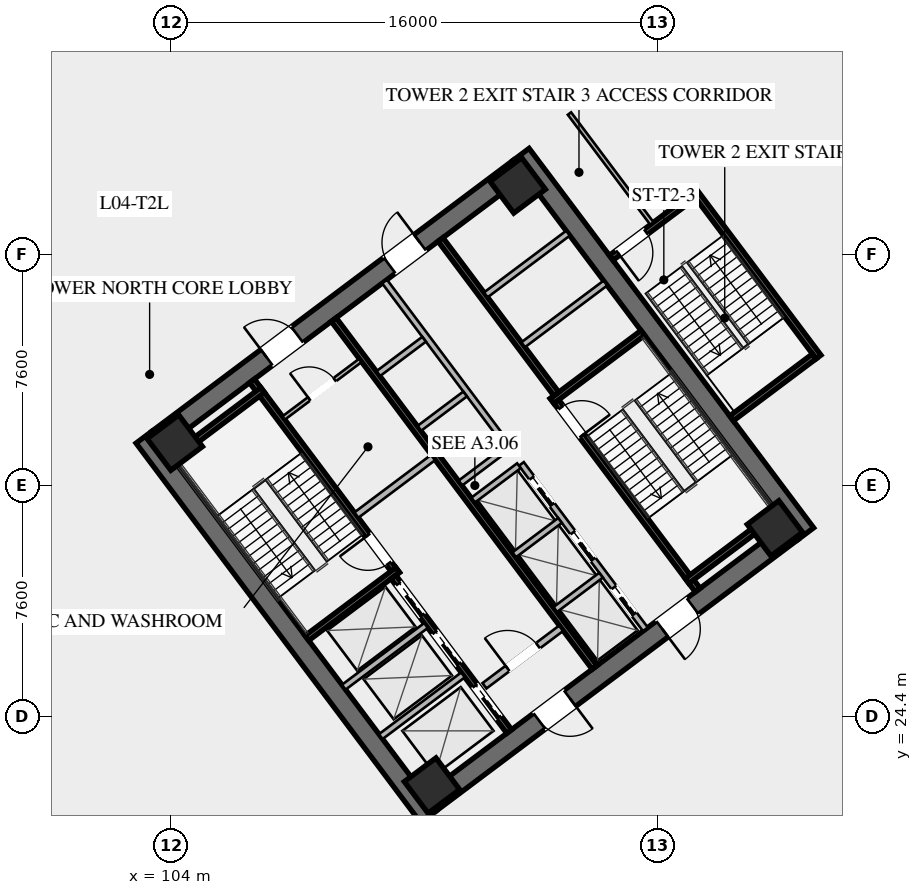
"""IFC4 building model, lengths in metres.
Left out: names, types, materials, properties, quantities, classifications, styles, units other than length and angle.
Written with IfcOpenShell. Run it as: python <this file> out.ifc"""

import sys

from ifc_helpers import new_model, si_unit, direction, frame, frame_2d, origin, origin_2d, place, context, subcontext, project, spatial, rectangle, hollow_rectangle, extrude, element, fill, save


model = new_model("IFC4")
c1 = context("Model", 3, precision=1e-05, world=origin(), true_north=direction((0.0, 1.0)))
c2 = subcontext(c1, "Body", "Model", "MODEL_VIEW")
j1 = project(units=[si_unit("LENGTHUNIT", "METRE"), si_unit("PLANEANGLEUNIT", "RADIAN")], contexts=[c1])
p1 = place(None, origin())
s1 = spatial("IfcSite", under=j1, at=p1, CompositionType="ELEMENT")
p2 = place(p1, origin())
s2 = spatial("IfcBuilding", under=s1, at=p2, CompositionType="ELEMENT")
p3 = place(p2, frame((0.0, 0.0, 19.8)))
s3 = spatial("IfcBuildingStorey", under=s2, at=p3, CompositionType="ELEMENT", Elevation=19.8)
for number, where, z_axis, x_axis in (
    (1, (112.476, 21.107, 0.0), (0.0, 0.0, 1.0), (-0.6, 0.8, 0.0)),
    (2, (115.524, 42.893, 0.0), (0.0, 0.0, 1.0), (0.6, -0.8, 0.0)),
):
    element("IfcWall", number, at=place(p3, frame(where, z_axis=z_axis, x_axis=x_axis)), inside=s3, PredefinedType="SHEAR", context=c2, shape_type="SweptSolid", body=[
        extrude(rectangle(XDim=15.6, YDim=0.65, at=frame_2d((7.8, 0.0))), origin(), (0.0, 0.0, 1.0), 4.8),
    ])
p4 = place(p3, frame((124.429, 30.478, 0.0), z_axis=(0.0, 0.0, 1.0), x_axis=(-0.799998028465, -0.600002628705, 0.0)))
e3 = element("IfcWall", 3, at=p4, inside=s3, PredefinedType="SHEAR", context=c2, shape_type="SweptSolid", body=[
    extrude(rectangle(XDim=14.86, YDim=0.65, at=frame_2d((7.43, 0.0))), origin(), (0.0, 0.0, 1.0), 4.8),
])
p5 = place(p4, frame((9.13, 0.0, 0.0)))
e4 = element("IfcOpeningElement", 4, at=p5, cuts=e3, PredefinedType="OPENING", context=c2, shape_type="SweptSolid", body=[
    extrude(rectangle(XDim=1.25, YDim=2.25, at=frame_2d((0.625, 1.125))), frame((0.0, 0.335, 0.0), z_axis=(0.0, -1.0, 0.0), x_axis=(1.0, 0.0, 0.0)), (0.0, 0.0, 1.0), 0.67),
])
p6 = place(p4, frame((4.08, 0.0, 0.0)))
e5 = element("IfcOpeningElement", 5, at=p6, cuts=e3, PredefinedType="OPENING", context=c2, shape_type="SweptSolid", body=[
    extrude(rectangle(XDim=1.25, YDim=2.25, at=frame_2d((0.625, 1.125))), frame((0.0, 0.335, 0.0), z_axis=(0.0, -1.0, 0.0), x_axis=(1.0, 0.0, 0.0)), (0.0, 0.0, 1.0), 0.67),
])
p7 = place(p3, frame((103.571, 33.522, 0.0), z_axis=(0.0, 0.0, 1.0), x_axis=(0.799998028465, 0.600002628705, 0.0)))
e6 = element("IfcWall", 6, at=p7, inside=s3, PredefinedType="SHEAR", context=c2, shape_type="SweptSolid", body=[
    extrude(rectangle(XDim=14.86, YDim=0.65, at=frame_2d((7.43, 0.0))), origin(), (0.0, 0.0, 1.0), 4.8),
])
p8 = place(p7, frame((4.48, 0.0, 0.0)))
e7 = element("IfcOpeningElement", 7, at=p8, cuts=e6, PredefinedType="OPENING", context=c2, shape_type="SweptSolid", body=[
    extrude(rectangle(XDim=1.25, YDim=2.25, at=frame_2d((0.625, 1.125))), frame((0.0, 0.335, 0.0), z_axis=(0.0, -1.0, 0.0), x_axis=(1.0, 0.0, 0.0)), (0.0, 0.0, 1.0), 0.67),
])
p9 = place(p7, frame((9.53, 0.0, 0.0)))
e8 = element("IfcOpeningElement", 8, at=p9, cuts=e6, PredefinedType="OPENING", context=c2, shape_type="SweptSolid", body=[
    extrude(rectangle(XDim=1.25, YDim=2.25, at=frame_2d((0.625, 1.125))), frame((0.0, 0.335, 0.0), z_axis=(0.0, -1.0, 0.0), x_axis=(1.0, 0.0, 0.0)), (0.0, 0.0, 1.0), 0.67),
])
for number, where, z_axis, x_axis in (
    (9, (112.59, 22.13, 0.0), (0.0, 0.0, 1.0), (0.8, 0.6, 0.0)),
    (10, (123.87, 30.59, 0.0), (0.0, 0.0, 1.0), (0.8, 0.6, 0.0)),
    (11, (115.41, 41.87, 0.0), (0.0, 0.0, 1.0), (0.8, 0.6, 0.0)),
    (12, (104.13, 33.41, 0.0), (0.0, 0.0, 1.0), (0.8, 0.6, 0.0)),
):
    element("IfcColumn", number, at=place(p3, frame(where, z_axis=z_axis, x_axis=x_axis)), inside=s3, PredefinedType="COLUMN", context=c2, shape_type="SweptSolid", body=[
        extrude(hollow_rectangle(XDim=1.3, YDim=1.3, WallThickness=0.05, at=origin_2d()), origin(), (0.0, 0.0, 1.0), 4.6),
    ])
p10 = place(p3, frame((111.44, 29.08, 0.0), z_axis=(0.0, 0.0, 1.0), x_axis=(-0.600009827119, 0.799992629566, 0.0)))
e13 = element("IfcWall", 13, at=p10, inside=s3, PredefinedType="SHEAR", context=c2, shape_type="SweptSolid", body=[
    extrude(rectangle(XDim=7.95, YDim=0.2, at=frame_2d((3.975, 0.0))), origin(), (0.0, 0.0, 1.0), 4.6),
])
p11 = place(p10, frame((0.45, 0.0, 0.0)))
e14 = element("IfcOpeningElement", 14, at=p11, cuts=e13, PredefinedType="OPENING", context=c2, shape_type="SweptSolid", body=[
    extrude(rectangle(XDim=1.15, YDim=2.2, at=frame_2d((0.575, 1.1))), frame((0.0, 0.11, 0.0), z_axis=(0.0, -1.0, 0.0), x_axis=(1.0, 0.0, 0.0)), (0.0, 0.0, 1.0), 0.22),
])
for number, where, z_axis, x_axis in (
    (15, (108.476, 26.982, 0.0), (0.0, 0.0, 1.0), (0.8, 0.6, 0.0)),
    (16, (104.036, 32.902, 0.0), (0.0, 0.0, 1.0), (0.8, 0.6, 0.0)),
):
    element("IfcWall", number, at=place(p3, frame(where, z_axis=z_axis, x_axis=x_axis)), inside=s3, PredefinedType="SHEAR", context=c2, shape_type="SweptSolid", body=[
        extrude(rectangle(XDim=3.73, YDim=0.2, at=frame_2d((1.865, 0.0))), origin(), (0.0, 0.0, 1.0), 4.6),
    ])
p12 = place(p3, frame((116.56, 34.92, 0.0), z_axis=(0.0, 0.0, 1.0), x_axis=(0.600009827119, -0.799992629566, 0.0)))
e17 = element("IfcWall", 17, at=p12, inside=s3, PredefinedType="SHEAR", context=c2, shape_type="SweptSolid", body=[
    extrude(rectangle(XDim=7.95, YDim=0.2, at=frame_2d((3.975, 0.0))), origin(), (0.0, 0.0, 1.0), 4.6),
])
p13 = place(p12, frame((0.45, 0.0, 0.0)))
e18 = element("IfcOpeningElement", 18, at=p13, cuts=e17, PredefinedType="OPENING", context=c2, shape_type="SweptSolid", body=[
    extrude(rectangle(XDim=1.15, YDim=2.2, at=frame_2d((0.575, 1.1))), frame((0.0, 0.11, 0.0), z_axis=(0.0, -1.0, 0.0), x_axis=(1.0, 0.0, 0.0)), (0.0, 0.0, 1.0), 0.22),
])
for number, where, z_axis, x_axis in (
    (19, (116.54, 34.78, 0.0), (0.0, 0.0, 1.0), (0.8, 0.6, 0.0)),
    (20, (120.98, 28.86, 0.0), (0.0, 0.0, 1.0), (0.8, 0.6, 0.0)),
):
    element("IfcWall", number, at=place(p3, frame(where, z_axis=z_axis, x_axis=x_axis)), inside=s3, PredefinedType="SHEAR", context=c2, shape_type="SweptSolid", body=[
        extrude(rectangle(XDim=3.73, YDim=0.2, at=frame_2d((1.865, 0.0))), origin(), (0.0, 0.0, 1.0), 4.6),
    ])
p14 = place(p3, frame((117.938, 26.016, 0.0), z_axis=(0.0, 0.0, 1.0), x_axis=(-0.600005463273, 0.799995902516, 0.0)))
e21 = element("IfcWall", 21, at=p14, inside=s3, PredefinedType="SHEAR", context=c2, shape_type="SweptSolid", body=[
    extrude(rectangle(XDim=14.3, YDim=0.2, at=frame_2d((7.15, 0.0))), origin(), (0.0, 0.0, 1.0), 4.6),
])
p15 = place(p3, frame((110.104, 31.028, 0.0), z_axis=(0.0, 0.0, 1.0), x_axis=(0.800018601094, 0.59997519774, 0.0)))
e22 = element("IfcWall", 22, at=p15, inside=s3, PredefinedType="SOLIDWALL", context=c2, shape_type="SweptSolid", body=[
    extrude(rectangle(XDim=3.15, YDim=0.22, at=frame_2d((1.575, 0.0))), origin(), (0.0, 0.0, 1.0), 3.643),
])
p16 = place(p3, frame((114.316, 25.412, 0.0), z_axis=(0.0, 0.0, 1.0), x_axis=(0.800018601094, 0.59997519774, 0.0)))
e23 = element("IfcWall", 23, at=p16, inside=s3, PredefinedType="SOLIDWALL", context=c2, shape_type="SweptSolid", body=[
    extrude(rectangle(XDim=3.15, YDim=0.22, at=frame_2d((1.575, 0.0))), origin(), (0.0, 0.0, 1.0), 3.643),
])
p17 = place(p16, frame((0.95, 0.0, 0.0)))
e24 = element("IfcOpeningElement", 24, at=p17, cuts=e23, PredefinedType="OPENING", context=c2, shape_type="SweptSolid", body=[
    extrude(rectangle(XDim=1.25, YDim=2.25, at=frame_2d((0.625, 1.125))), frame((0.0, 0.12, 0.0), z_axis=(0.0, -1.0, 0.0), x_axis=(1.0, 0.0, 0.0)), (0.0, 0.0, 1.0), 0.24),
])
p18 = place(p3, frame((115.13, 23.91, 0.0), z_axis=(0.0, 0.0, 1.0), x_axis=(-0.599975393228, 0.800018454488, 0.0)))
e25 = element("IfcWall", 25, at=p18, inside=s3, PredefinedType="SHEAR", context=c2, shape_type="SweptSolid", body=[
    extrude(rectangle(XDim=6.35, YDim=0.2, at=frame_2d((3.175, 0.0))), origin(), (0.0, 0.0, 1.0), 4.6),
])
p19 = place(p18, frame((4.775, 0.0, 0.0)))
e26 = element("IfcOpeningElement", 26, at=p19, cuts=e25, PredefinedType="OPENING", context=c2, shape_type="SweptSolid", body=[
    extrude(rectangle(XDim=1.3, YDim=2.25, at=frame_2d((0.65, 1.125))), frame((0.0, 0.11, 0.0), z_axis=(0.0, -1.0, 0.0), x_axis=(1.0, 0.0, 0.0)), (0.0, 0.0, 1.0), 0.22),
])
p20 = place(p18, frame((2.775, 0.0, 0.0)))
e27 = element("IfcOpeningElement", 27, at=p20, cuts=e25, PredefinedType="OPENING", context=c2, shape_type="SweptSolid", body=[
    extrude(rectangle(XDim=1.3, YDim=2.25, at=frame_2d((0.65, 1.125))), frame((0.0, 0.11, 0.0), z_axis=(0.0, -1.0, 0.0), x_axis=(1.0, 0.0, 0.0)), (0.0, 0.0, 1.0), 0.22),
])
p21 = place(p18, frame((0.575, 0.0, 0.0)))
e28 = element("IfcOpeningElement", 28, at=p21, cuts=e25, PredefinedType="OPENING", context=c2, shape_type="SweptSolid", body=[
    extrude(rectangle(XDim=1.3, YDim=2.25, at=frame_2d((0.65, 1.125))), frame((0.0, 0.11, 0.0), z_axis=(0.0, -1.0, 0.0), x_axis=(1.0, 0.0, 0.0)), (0.0, 0.0, 1.0), 0.22),
])
for number, where, z_axis, x_axis in (
    (29, (110.906, 23.742, 0.0), (0.0, 0.0, 1.0), (0.8, 0.6, 0.0)),
    (30, (109.688, 25.366, 0.0), (0.0, 0.0, 1.0), (0.8, 0.6, 0.0)),
):
    element("IfcWall", number, at=place(p3, frame(where, z_axis=z_axis, x_axis=x_axis)), inside=s3, PredefinedType="SOLIDWALL", context=c2, shape_type="SweptSolid", body=[
        extrude(rectangle(XDim=3.38, YDim=0.2, at=frame_2d((1.69, 0.0))), origin(), (0.0, 0.0, 1.0), 4.6),
    ])
p22 = place(p3, frame((112.87, 40.09, 0.0), z_axis=(0.0, 0.0, 1.0), x_axis=(0.599975393228, -0.800018454488, 0.0)))
e31 = element("IfcWall", 31, at=p22, inside=s3, PredefinedType="SHEAR", context=c2, shape_type="SweptSolid", body=[
    extrude(rectangle(XDim=6.35, YDim=0.2, at=frame_2d((3.175, 0.0))), origin(), (0.0, 0.0, 1.0), 4.6),
])
for number, where, z_axis, x_axis in (
    (32, (115.59, 36.63, 0.0), (0.0, 0.0, 1.0), (0.8, 0.6, 0.0)),
    (33, (114.36, 38.27, 0.0), (0.0, 0.0, 1.0), (0.8, 0.6, 0.0)),
):
    element("IfcWall", number, at=place(p3, frame(where, z_axis=z_axis, x_axis=x_axis)), inside=s3, PredefinedType="SOLIDWALL", context=c2, shape_type="SweptSolid", body=[
        extrude(rectangle(XDim=3.38, YDim=0.2, at=frame_2d((1.69, 0.0))), origin(), (0.0, 0.0, 1.0), 4.6),
    ])
p23 = place(p3, frame((107.71, 34.22, 0.0), z_axis=(0.0, 0.0, 1.0), x_axis=(0.799981399002, 0.60002480053, 0.0)))
e34 = element("IfcWall", 34, at=p23, inside=s3, PredefinedType="PARTITIONING", context=c2, shape_type="SweptSolid", body=[
    extrude(rectangle(XDim=3.15, YDim=0.135, at=frame_2d((1.575, 0.0))), origin(), (0.0, 0.0, 1.0), 3.643),
])
p24 = place(p23, frame((1.05, 0.0, 0.0)))
e35 = element("IfcOpeningElement", 35, at=p24, cuts=e34, PredefinedType="OPENING", context=c2, shape_type="SweptSolid", body=[
    extrude(rectangle(XDim=1.05, YDim=2.2, at=frame_2d((0.525, 1.1))), frame((0.0, 0.077, 0.0), z_axis=(0.0, -1.0, 0.0), x_axis=(1.0, 0.0, 0.0)), (0.0, 0.0, 1.0), 0.155),
])
p25 = place(p3, frame((119.61, 27.27, 0.0), z_axis=(0.0, 0.0, 1.0), x_axis=(-0.600011488909, 0.79999138319, 0.0)))
e36 = element("IfcWall", 36, at=p25, inside=s3, PredefinedType="SOLIDWALL", context=c2, shape_type="SweptSolid", body=[
    extrude(rectangle(XDim=6.8, YDim=0.2, at=frame_2d((3.4, 0.0))), origin(), (0.0, 0.0, 1.0), 4.6),
])
p26 = place(p25, frame((0.625, 0.0, 0.0)))
e37 = element("IfcOpeningElement", 37, at=p26, cuts=e36, PredefinedType="OPENING", context=c2, shape_type="SweptSolid", body=[
    extrude(rectangle(XDim=1.1, YDim=2.2, at=frame_2d((0.55, 1.1))), frame((0.0, 0.11, 0.0), z_axis=(0.0, -1.0, 0.0), x_axis=(1.0, 0.0, 0.0)), (0.0, 0.0, 1.0), 0.22),
])
p27 = place(p25, frame((2.875, 0.0, 0.0)))
e38 = element("IfcOpeningElement", 38, at=p27, cuts=e36, PredefinedType="OPENING", context=c2, shape_type="SweptSolid", body=[
    extrude(rectangle(XDim=1.1, YDim=2.2, at=frame_2d((0.55, 1.1))), frame((0.0, 0.11, 0.0), z_axis=(0.0, -1.0, 0.0), x_axis=(1.0, 0.0, 0.0)), (0.0, 0.0, 1.0), 0.22),
])
p28 = place(p25, frame((5.125, 0.0, 0.0)))
e39 = element("IfcOpeningElement", 39, at=p28, cuts=e36, PredefinedType="OPENING", context=c2, shape_type="SweptSolid", body=[
    extrude(rectangle(XDim=1.1, YDim=2.2, at=frame_2d((0.55, 1.1))), frame((0.0, 0.11, 0.0), z_axis=(0.0, -1.0, 0.0), x_axis=(1.0, 0.0, 0.0)), (0.0, 0.0, 1.0), 0.22),
])
p29 = place(p3, frame((116.646, 27.922, 0.0), z_axis=(0.0, 0.0, 1.0), x_axis=(0.8, 0.6, 0.0)))
e40 = element("IfcWall", 40, at=p29, inside=s3, PredefinedType="SOLIDWALL", context=c2, shape_type="SweptSolid", body=[
    extrude(rectangle(XDim=1.88, YDim=0.2, at=frame_2d((0.94, 0.0))), origin(), (0.0, 0.0, 1.0), 4.6),
])
p30 = place(p3, frame((115.296, 29.722, 0.0), z_axis=(0.0, 0.0, 1.0), x_axis=(0.799984418148, 0.600020775241, 0.0)))
e41 = element("IfcWall", 41, at=p30, inside=s3, PredefinedType="SOLIDWALL", context=c2, shape_type="SweptSolid", body=[
    extrude(rectangle(XDim=1.88, YDim=0.2, at=frame_2d((0.94, 0.0))), origin(), (0.0, 0.0, 1.0), 4.6),
])
p31 = place(p3, frame((113.946, 31.522, 0.0), z_axis=(0.0, 0.0, 1.0), x_axis=(0.8, 0.6, 0.0)))
e42 = element("IfcWall", 42, at=p31, inside=s3, PredefinedType="SOLIDWALL", context=c2, shape_type="SweptSolid", body=[
    extrude(rectangle(XDim=1.88, YDim=0.2, at=frame_2d((0.94, 0.0))), origin(), (0.0, 0.0, 1.0), 4.6),
])
p32 = place(p3, frame((115.11, 33.27, 0.0), z_axis=(0.0, 0.0, 1.0), x_axis=(-0.600011488909, 0.79999138319, 0.0)))
e43 = element("IfcWall", 43, at=p32, inside=s3, PredefinedType="SOLIDWALL", context=c2, shape_type="SweptSolid", body=[
    extrude(rectangle(XDim=6.8, YDim=0.2, at=frame_2d((3.4, 0.0))), origin(), (0.0, 0.0, 1.0), 4.6),
])
p33 = place(p3, frame((113.526, 32.082, 0.0), z_axis=(0.0, 0.0, 1.0), x_axis=(0.800046745961, 0.599937666993, 0.0)))
e44 = element("IfcWall", 44, at=p33, inside=s3, PredefinedType="SOLIDWALL", context=c2, shape_type="SweptSolid", body=[
    extrude(rectangle(XDim=1.88, YDim=0.2, at=frame_2d((0.94, 0.0))), origin(), (0.0, 0.0, 1.0), 4.6),
])
p34 = place(p3, frame((112.176, 33.882, 0.0), z_axis=(0.0, 0.0, 1.0), x_axis=(0.8, 0.6, 0.0)))
e45 = element("IfcWall", 45, at=p34, inside=s3, PredefinedType="SOLIDWALL", context=c2, shape_type="SweptSolid", body=[
    extrude(rectangle(XDim=1.88, YDim=0.2, at=frame_2d((0.94, 0.0))), origin(), (0.0, 0.0, 1.0), 4.6),
])
p35 = place(p3, frame((110.826, 35.682, 0.0), z_axis=(0.0, 0.0, 1.0), x_axis=(0.799984418148, 0.600020775241, 0.0)))
e46 = element("IfcWall", 46, at=p35, inside=s3, PredefinedType="SOLIDWALL", context=c2, shape_type="SweptSolid", body=[
    extrude(rectangle(XDim=1.88, YDim=0.2, at=frame_2d((0.94, 0.0))), origin(), (0.0, 0.0, 1.0), 4.6),
])
p36 = place(p3, frame((125.304, 36.228, 0.0), z_axis=(0.0, 0.0, 1.0), x_axis=(-0.59998851072, 0.800008616831, 0.0)))
e47 = element("IfcWall", 47, at=p36, inside=s3, PredefinedType="SHEAR", context=c2, shape_type="SweptSolid", body=[
    extrude(rectangle(XDim=6.8, YDim=0.2, at=frame_2d((3.4, 0.0))), origin(), (0.0, 0.0, 1.0), 4.6),
])
p37 = place(p3, frame((121.204, 41.528, 0.0), z_axis=(0.0, 0.0, 1.0), x_axis=(-0.800017232136, -0.599977023131, 0.0)))
e48 = element("IfcWall", 48, at=p37, inside=s3, PredefinedType="SHEAR", context=c2, shape_type="SweptSolid", body=[
    extrude(rectangle(XDim=3.4, YDim=0.2, at=frame_2d((1.7, 0.0))), origin(), (0.0, 0.0, 1.0), 4.6),
])
p38 = place(p37, frame((1.975, 0.0, 0.0)))
e49 = element("IfcOpeningElement", 49, at=p38, cuts=e48, PredefinedType="OPENING", context=c2, shape_type="SweptSolid", body=[
    extrude(rectangle(XDim=1.15, YDim=2.2, at=frame_2d((0.575, 1.1))), frame((0.0, 0.11, 0.0), z_axis=(0.0, -1.0, 0.0), x_axis=(1.0, 0.0, 0.0)), (0.0, 0.0, 1.0), 0.22),
])
p39 = place(p3, frame((122.444, 34.208, 0.0), z_axis=(0.0, 0.0, 1.0), x_axis=(0.79999138319, 0.600011488909, 0.0)))
e50 = element("IfcWall", 50, at=p39, inside=s3, PredefinedType="SHEAR", context=c2, shape_type="SweptSolid", body=[
    extrude(rectangle(XDim=3.4, YDim=0.2, at=frame_2d((1.7, 0.0))), origin(), (0.0, 0.0, 1.0), 4.6),
])
p40 = place(p3, frame((119.824, 40.618, 0.0), z_axis=(0.0, 0.0, 1.0), x_axis=(-0.59999135767, 0.800006481675, 0.0)))
e51 = element("IfcWall", 51, at=p40, inside=s3, PredefinedType="PARTITIONING", context=c2, shape_type="SweptSolid", body=[
    extrude(rectangle(XDim=4.52, YDim=0.135, at=frame_2d((2.26, 0.0))), origin(), (0.0, 0.0, 1.0), 3.643),
])
p41 = place(p8, origin())
e52 = element("IfcDoor", 52, at=p41, inside=s3, OperationType="SINGLE_SWING_LEFT", PredefinedType="DOOR", context=c2, shape_type="SweptSolid", body=[
    extrude(rectangle(XDim=1.25, YDim=2.25, at=frame_2d((0.625, 1.125))), frame((0.0, 0.025, 0.0), z_axis=(0.0, -1.0, 0.0), x_axis=(1.0, 0.0, 0.0)), (0.0, 0.0, 1.0), 0.05),
])
fill(e7, e52)
p42 = place(p9, origin())
e53 = element("IfcDoor", 53, at=p42, inside=s3, OperationType="SINGLE_SWING_RIGHT", PredefinedType="DOOR", context=c2, shape_type="SweptSolid", body=[
    extrude(rectangle(XDim=1.25, YDim=2.25, at=frame_2d((0.625, 1.125))), frame((0.0, 0.025, 0.0), z_axis=(0.0, -1.0, 0.0), x_axis=(1.0, 0.0, 0.0)), (0.0, 0.0, 1.0), 0.05),
])
fill(e8, e53)
p43 = place(p5, origin())
e54 = element("IfcDoor", 54, at=p43, inside=s3, OperationType="SINGLE_SWING_LEFT", PredefinedType="DOOR", context=c2, shape_type="SweptSolid", body=[
    extrude(rectangle(XDim=1.25, YDim=2.25, at=frame_2d((0.625, 1.125))), frame((0.0, 0.025, 0.0), z_axis=(0.0, -1.0, 0.0), x_axis=(1.0, 0.0, 0.0)), (0.0, 0.0, 1.0), 0.05),
])
fill(e4, e54)
p44 = place(p6, origin())
e55 = element("IfcDoor", 55, at=p44, inside=s3, OperationType="SINGLE_SWING_RIGHT", PredefinedType="DOOR", context=c2, shape_type="SweptSolid", body=[
    extrude(rectangle(XDim=1.25, YDim=2.25, at=frame_2d((0.625, 1.125))), frame((0.0, 0.025, 0.0), z_axis=(0.0, -1.0, 0.0), x_axis=(1.0, 0.0, 0.0)), (0.0, 0.0, 1.0), 0.05),
])
fill(e5, e55)
p45 = place(p11, origin())
e56 = element("IfcDoor", 56, at=p45, inside=s3, OperationType="SINGLE_SWING_RIGHT", PredefinedType="DOOR", context=c2, shape_type="SweptSolid", body=[
    extrude(rectangle(XDim=1.15, YDim=2.2, at=frame_2d((0.575, 1.1))), frame((0.0, 0.025, 0.0), z_axis=(0.0, -1.0, 0.0), x_axis=(1.0, 0.0, 0.0)), (0.0, 0.0, 1.0), 0.05),
])
fill(e14, e56)
p46 = place(p13, origin())
e57 = element("IfcDoor", 57, at=p46, inside=s3, OperationType="SINGLE_SWING_RIGHT", PredefinedType="DOOR", context=c2, shape_type="SweptSolid", body=[
    extrude(rectangle(XDim=1.15, YDim=2.2, at=frame_2d((0.575, 1.1))), frame((0.0, 0.025, 0.0), z_axis=(0.0, -1.0, 0.0), x_axis=(1.0, 0.0, 0.0)), (0.0, 0.0, 1.0), 0.05),
])
fill(e18, e57)
p47 = place(p17, origin())
e58 = element("IfcDoor", 58, at=p47, inside=s3, OperationType="SINGLE_SWING_LEFT", PredefinedType="DOOR", context=c2, shape_type="SweptSolid", body=[
    extrude(rectangle(XDim=1.25, YDim=2.25, at=frame_2d((0.625, 1.125))), frame((0.0, 0.025, 0.0), z_axis=(0.0, -1.0, 0.0), x_axis=(1.0, 0.0, 0.0)), (0.0, 0.0, 1.0), 0.05),
])
fill(e24, e58)
p48 = place(p24, origin())
e59 = element("IfcDoor", 59, at=p48, inside=s3, OperationType="SINGLE_SWING_LEFT", PredefinedType="DOOR", context=c2, shape_type="SweptSolid", body=[
    extrude(rectangle(XDim=1.05, YDim=2.2, at=frame_2d((0.525, 1.1))), frame((0.0, 0.025, 0.0), z_axis=(0.0, -1.0, 0.0), x_axis=(1.0, 0.0, 0.0)), (0.0, 0.0, 1.0), 0.05),
])
fill(e35, e59)
p49 = place(p38, origin())
e60 = element("IfcDoor", 60, at=p49, inside=s3, OperationType="SINGLE_SWING_RIGHT", PredefinedType="DOOR", context=c2, shape_type="SweptSolid", body=[
    extrude(rectangle(XDim=1.15, YDim=2.2, at=frame_2d((0.575, 1.1))), frame((0.0, 0.025, 0.0), z_axis=(0.0, -1.0, 0.0), x_axis=(1.0, 0.0, 0.0)), (0.0, 0.0, 1.0), 0.05),
])
fill(e49, e60)
p50 = place(p19, origin())
e61 = element("IfcDoor", 61, at=p50, inside=s3, OperationType="SLIDING_TO_LEFT", PredefinedType="DOOR", context=c2, shape_type="SweptSolid", body=[
    extrude(rectangle(XDim=1.3, YDim=2.25, at=frame_2d((0.65, 1.125))), frame((0.0, 0.025, 0.0), z_axis=(0.0, -1.0, 0.0), x_axis=(1.0, 0.0, 0.0)), (0.0, 0.0, 1.0), 0.05),
])
fill(e26, e61)
p51 = place(p20, origin())
e62 = element("IfcDoor", 62, at=p51, inside=s3, OperationType="SLIDING_TO_LEFT", PredefinedType="DOOR", context=c2, shape_type="SweptSolid", body=[
    extrude(rectangle(XDim=1.3, YDim=2.25, at=frame_2d((0.65, 1.125))), frame((0.0, 0.025, 0.0), z_axis=(0.0, -1.0, 0.0), x_axis=(1.0, 0.0, 0.0)), (0.0, 0.0, 1.0), 0.05),
])
fill(e27, e62)
p52 = place(p21, origin())
e63 = element("IfcDoor", 63, at=p52, inside=s3, OperationType="SLIDING_TO_LEFT", PredefinedType="DOOR", context=c2, shape_type="SweptSolid", body=[
    extrude(rectangle(XDim=1.3, YDim=2.25, at=frame_2d((0.65, 1.125))), frame((0.0, 0.025, 0.0), z_axis=(0.0, -1.0, 0.0), x_axis=(1.0, 0.0, 0.0)), (0.0, 0.0, 1.0), 0.05),
])
fill(e28, e63)
p53 = place(p26, origin())
e64 = element("IfcDoor", 64, at=p53, inside=s3, OperationType="SLIDING_TO_LEFT", PredefinedType="DOOR", context=c2, shape_type="SweptSolid", body=[
    extrude(rectangle(XDim=1.1, YDim=2.2, at=frame_2d((0.55, 1.1))), frame((0.0, 0.025, 0.0), z_axis=(0.0, -1.0, 0.0), x_axis=(1.0, 0.0, 0.0)), (0.0, 0.0, 1.0), 0.05),
])
fill(e37, e64)
p54 = place(p27, origin())
e65 = element("IfcDoor", 65, at=p54, inside=s3, OperationType="SLIDING_TO_LEFT", PredefinedType="DOOR", context=c2, shape_type="SweptSolid", body=[
    extrude(rectangle(XDim=1.1, YDim=2.2, at=frame_2d((0.55, 1.1))), frame((0.0, 0.025, 0.0), z_axis=(0.0, -1.0, 0.0), x_axis=(1.0, 0.0, 0.0)), (0.0, 0.0, 1.0), 0.05),
])
fill(e38, e65)
p55 = place(p28, origin())
e66 = element("IfcDoor", 66, at=p55, inside=s3, OperationType="SLIDING_TO_LEFT", PredefinedType="DOOR", context=c2, shape_type="SweptSolid", body=[
    extrude(rectangle(XDim=1.1, YDim=2.2, at=frame_2d((0.55, 1.1))), frame((0.0, 0.025, 0.0), z_axis=(0.0, -1.0, 0.0), x_axis=(1.0, 0.0, 0.0)), (0.0, 0.0, 1.0), 0.05),
])
fill(e39, e66)
save(model, sys.argv[1])
